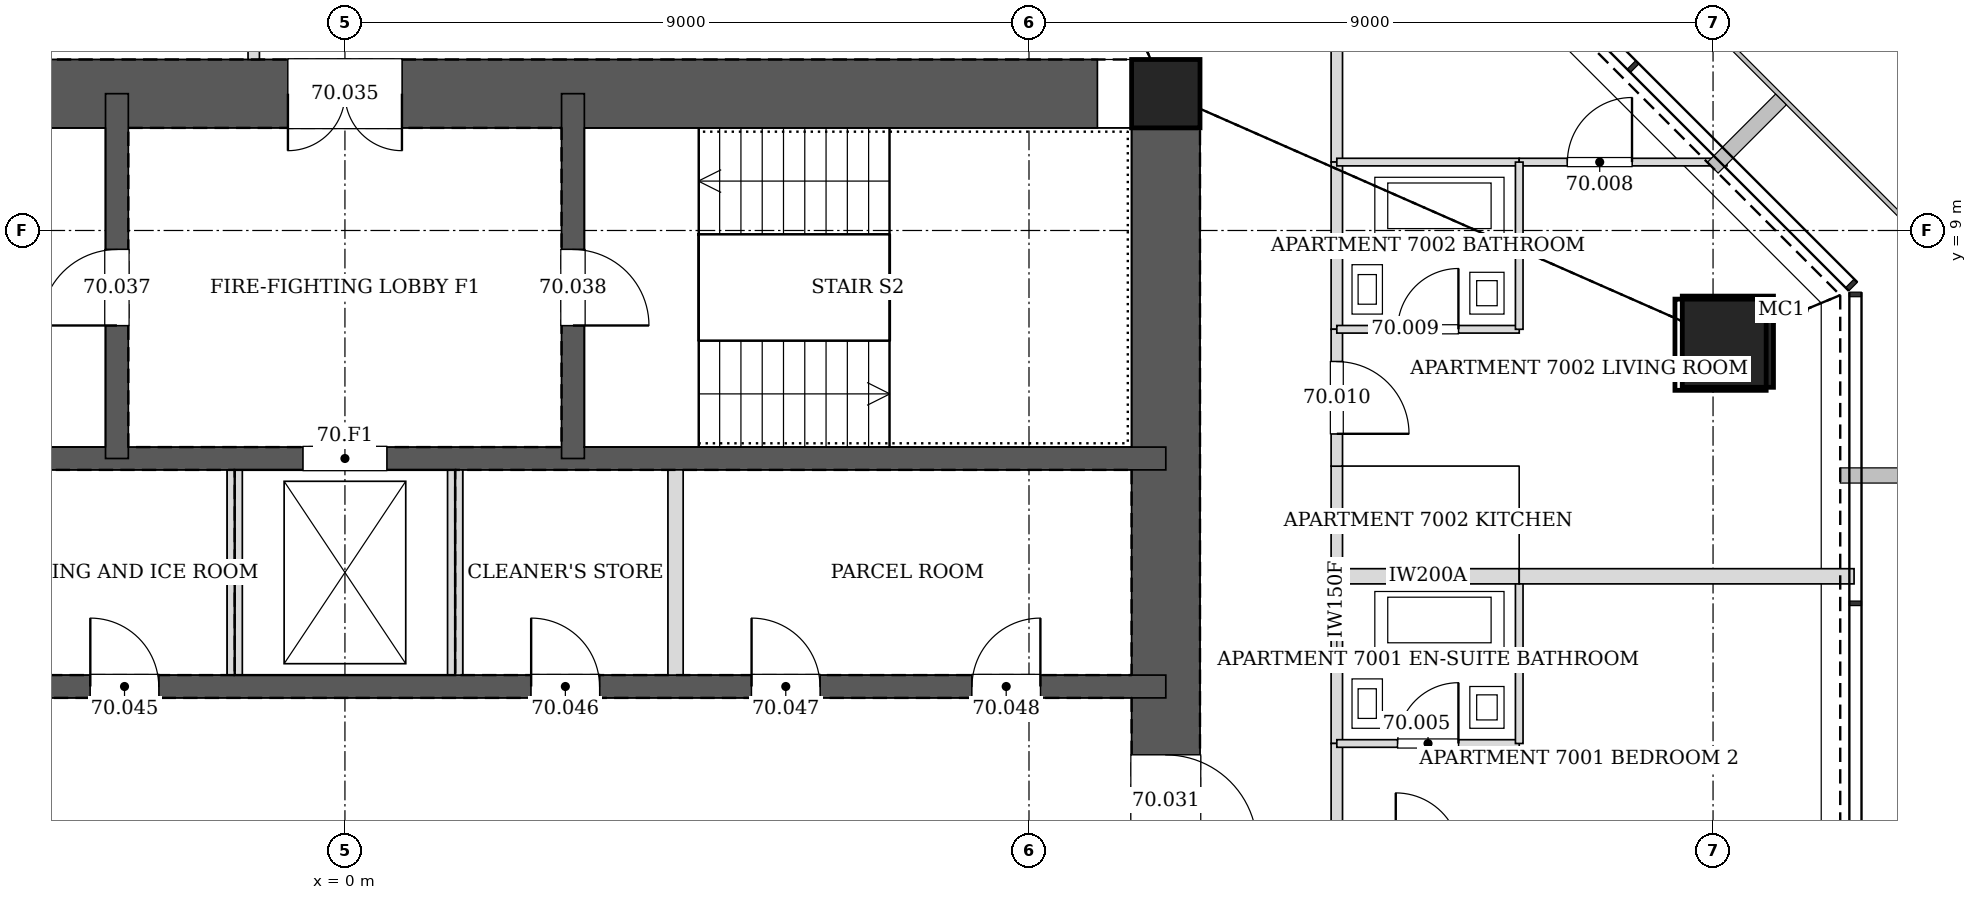
"""IFC4 building model, lengths in metres.
Left out: names, types, materials, properties, quantities, classifications, styles, units other than length and angle.
Written with IfcOpenShell. Run it as: python <this file> out.ifc"""

import sys

from ifc_helpers import new_model, si_unit, direction, frame, frame_2d, origin, origin_2d, place, context, subcontext, project, spatial, rectangle, hollow_rectangle, extrude, element, fill, save


model = new_model("IFC4")
c1 = context("Model", 3, precision=1e-05, world=origin(), true_north=direction((0.0, 1.0)))
c2 = subcontext(c1, "Body", "Model", "MODEL_VIEW")
j1 = project(units=[si_unit("LENGTHUNIT", "METRE"), si_unit("PLANEANGLEUNIT", "RADIAN")], contexts=[c1])
p1 = place(None, origin())
s1 = spatial("IfcSite", under=j1, at=p1, CompositionType="ELEMENT")
p2 = place(p1, origin())
s2 = spatial("IfcBuilding", under=s1, at=p2, CompositionType="ELEMENT")
p3 = place(p2, frame((0.0, 0.0, 287.8)))
s3 = spatial("IfcBuildingStorey", under=s2, at=p3, CompositionType="ELEMENT", Elevation=287.8)
p4 = place(p3, frame((18.195, 7.537, 0.0), z_axis=(-0.02827915051, -0.01169924247, 0.999531598986), x_axis=(0.382282742426, -0.924045401938, 0.0)))
e1 = element("IfcColumn", 1, at=p4, inside=s3, PredefinedType="COLUMN", context=c2, shape_type="SweptSolid", body=[
    extrude(hollow_rectangle(XDim=1.2, YDim=1.2, WallThickness=0.055, at=origin_2d()), origin(), (0.0, 0.0, 1.0), 3.402),
])
p5 = place(p3, frame((10.8, 10.8, 0.0), z_axis=(0.0, 0.0, 1.0), x_axis=(1.0, 0.0, 0.0)))
e2 = element("IfcColumn", 2, at=p5, inside=s3, PredefinedType="COLUMN", context=c2, shape_type="SweptSolid", body=[
    extrude(hollow_rectangle(XDim=0.9, YDim=0.9, WallThickness=0.04, at=origin_2d()), origin(), (0.0, 0.0, 1.0), 3.4),
])
p6 = place(p3, frame((10.8, -10.8, 0.0), z_axis=(0.0, 0.0, 1.0), x_axis=(0.0, 1.0, 0.0)))
e3 = element("IfcWall", 3, at=p6, inside=s3, PredefinedType="SOLIDWALL", context=c2, shape_type="SweptSolid", body=[
    extrude(rectangle(XDim=21.6, YDim=0.9, at=frame_2d((10.8, 0.0))), origin(), (0.0, 0.0, 1.0), 3.4),
])
p7 = place(p6, frame((11.7, 0.0, 0.0)))
e4 = element("IfcOpeningElement", 4, at=p7, cuts=e3, PredefinedType="OPENING", context=c2, shape_type="SweptSolid", body=[
    extrude(rectangle(XDim=1.2, YDim=2.1, at=frame_2d((0.6, 1.05))), frame((0.0, 0.46, 0.0), z_axis=(0.0, -1.0, 0.0), x_axis=(1.0, 0.0, 0.0)), (0.0, 0.0, 1.0), 0.92),
])
p8 = place(p6, frame((8.7, 0.0, 0.0)))
e5 = element("IfcOpeningElement", 5, at=p8, cuts=e3, PredefinedType="OPENING", context=c2, shape_type="SweptSolid", body=[
    extrude(rectangle(XDim=1.2, YDim=2.1, at=frame_2d((0.6, 1.05))), frame((0.0, 0.46, 0.0), z_axis=(0.0, -1.0, 0.0), x_axis=(1.0, 0.0, 0.0)), (0.0, 0.0, 1.0), 0.92),
])
p9 = place(p3, frame((10.8, 10.8, 0.0), z_axis=(0.0, 0.0, 1.0), x_axis=(-1.0, 0.0, 0.0)))
e6 = element("IfcWall", 6, at=p9, inside=s3, PredefinedType="SOLIDWALL", context=c2, shape_type="SweptSolid", body=[
    extrude(rectangle(XDim=21.6, YDim=0.9, at=frame_2d((10.8, 0.0))), origin(), (0.0, 0.0, 1.0), 3.4),
])
p10 = place(p9, frame((10.05, 0.0, 0.0)))
e7 = element("IfcOpeningElement", 7, at=p10, cuts=e6, PredefinedType="OPENING", context=c2, shape_type="SweptSolid", body=[
    extrude(rectangle(XDim=1.5, YDim=2.1, at=frame_2d((0.75, 1.05))), frame((0.0, 0.46, 0.0), z_axis=(0.0, -1.0, 0.0), x_axis=(1.0, 0.0, 0.0)), (0.0, 0.0, 1.0), 0.92),
])
p11 = place(p3, frame((-10.8, 3.0, 0.0), z_axis=(0.0, 0.0, 1.0), x_axis=(1.0, 0.0, 0.0)))
e8 = element("IfcWall", 8, at=p11, inside=s3, PredefinedType="SOLIDWALL", context=c2, shape_type="SweptSolid", body=[
    extrude(rectangle(XDim=21.6, YDim=0.3, at=frame_2d((10.8, 0.0))), origin(), (0.0, 0.0, 1.0), 3.4),
])
p12 = place(p11, frame((1.65, 0.0, 0.0)))
e9 = element("IfcOpeningElement", 9, at=p12, cuts=e8, PredefinedType="OPENING", context=c2, shape_type="SweptSolid", body=[
    extrude(rectangle(XDim=0.9, YDim=2.1, at=frame_2d((0.45, 1.05))), frame((0.0, 0.16, 0.0), z_axis=(0.0, -1.0, 0.0), x_axis=(1.0, 0.0, 0.0)), (0.0, 0.0, 1.0), 0.32),
])
p13 = place(p11, frame((7.45, 0.0, 0.0)))
e10 = element("IfcOpeningElement", 10, at=p13, cuts=e8, PredefinedType="OPENING", context=c2, shape_type="SweptSolid", body=[
    extrude(rectangle(XDim=0.9, YDim=2.1, at=frame_2d((0.45, 1.05))), frame((0.0, 0.16, 0.0), z_axis=(0.0, -1.0, 0.0), x_axis=(1.0, 0.0, 0.0)), (0.0, 0.0, 1.0), 0.32),
])
p14 = place(p11, frame((13.25, 0.0, 0.0)))
e11 = element("IfcOpeningElement", 11, at=p14, cuts=e8, PredefinedType="OPENING", context=c2, shape_type="SweptSolid", body=[
    extrude(rectangle(XDim=0.9, YDim=2.1, at=frame_2d((0.45, 1.05))), frame((0.0, 0.16, 0.0), z_axis=(0.0, -1.0, 0.0), x_axis=(1.0, 0.0, 0.0)), (0.0, 0.0, 1.0), 0.32),
])
p15 = place(p11, frame((16.15, 0.0, 0.0)))
e12 = element("IfcOpeningElement", 12, at=p15, cuts=e8, PredefinedType="OPENING", context=c2, shape_type="SweptSolid", body=[
    extrude(rectangle(XDim=0.9, YDim=2.1, at=frame_2d((0.45, 1.05))), frame((0.0, 0.16, 0.0), z_axis=(0.0, -1.0, 0.0), x_axis=(1.0, 0.0, 0.0)), (0.0, 0.0, 1.0), 0.32),
])
p16 = place(p11, frame((19.05, 0.0, 0.0)))
e13 = element("IfcOpeningElement", 13, at=p16, cuts=e8, PredefinedType="OPENING", context=c2, shape_type="SweptSolid", body=[
    extrude(rectangle(XDim=0.9, YDim=2.1, at=frame_2d((0.45, 1.05))), frame((0.0, 0.16, 0.0), z_axis=(0.0, -1.0, 0.0), x_axis=(1.0, 0.0, 0.0)), (0.0, 0.0, 1.0), 0.32),
])
p17 = place(p11, frame((4.55, 0.0, 0.0)))
e14 = element("IfcOpeningElement", 14, at=p17, cuts=e8, PredefinedType="OPENING", context=c2, shape_type="SweptSolid", body=[
    extrude(rectangle(XDim=0.9, YDim=2.1, at=frame_2d((0.45, 1.05))), frame((0.0, 0.16, 0.0), z_axis=(0.0, -1.0, 0.0), x_axis=(1.0, 0.0, 0.0)), (0.0, 0.0, 1.0), 0.32),
])
p18 = place(p3, frame((-10.8, 6.0, 0.0), z_axis=(0.0, 0.0, 1.0), x_axis=(1.0, 0.0, 0.0)))
e15 = element("IfcWall", 15, at=p18, inside=s3, PredefinedType="SOLIDWALL", context=c2, shape_type="SweptSolid", body=[
    extrude(rectangle(XDim=21.6, YDim=0.3, at=frame_2d((10.8, 0.0))), origin(), (0.0, 0.0, 1.0), 3.4),
])
p19 = place(p18, frame((10.25, 0.0, 0.0)))
e16 = element("IfcOpeningElement", 16, at=p19, cuts=e15, PredefinedType="OPENING", context=c2, shape_type="SweptSolid", body=[
    extrude(rectangle(XDim=1.1, YDim=2.1, at=frame_2d((0.55, 1.05))), frame((0.0, 0.16, 0.0), z_axis=(0.0, -1.0, 0.0), x_axis=(1.0, 0.0, 0.0)), (0.0, 0.0, 1.0), 0.32),
])
p20 = place(p3, frame((-3.0, 6.0, 0.0), z_axis=(0.0, 0.0, 1.0), x_axis=(0.0, 1.0, 0.0)))
e17 = element("IfcWall", 17, at=p20, inside=s3, PredefinedType="SOLIDWALL", context=c2, shape_type="SweptSolid", body=[
    extrude(rectangle(XDim=4.8, YDim=0.3, at=frame_2d((2.4, 0.0))), origin(), (0.0, 0.0, 1.0), 3.4),
])
p21 = place(p20, frame((1.75, 0.0, 0.0)))
e18 = element("IfcOpeningElement", 18, at=p21, cuts=e17, PredefinedType="OPENING", context=c2, shape_type="SweptSolid", body=[
    extrude(rectangle(XDim=1.0, YDim=2.1, at=frame_2d((0.5, 1.05))), frame((0.0, 0.16, 0.0), z_axis=(0.0, -1.0, 0.0), x_axis=(1.0, 0.0, 0.0)), (0.0, 0.0, 1.0), 0.32),
])
p22 = place(p3, frame((3.0, 6.0, 0.0), z_axis=(0.0, 0.0, 1.0), x_axis=(0.0, 1.0, 0.0)))
e19 = element("IfcWall", 19, at=p22, inside=s3, PredefinedType="SOLIDWALL", context=c2, shape_type="SweptSolid", body=[
    extrude(rectangle(XDim=4.8, YDim=0.3, at=frame_2d((2.4, 0.0))), origin(), (0.0, 0.0, 1.0), 3.4),
])
p23 = place(p22, frame((1.75, 0.0, 0.0)))
e20 = element("IfcOpeningElement", 20, at=p23, cuts=e19, PredefinedType="OPENING", context=c2, shape_type="SweptSolid", body=[
    extrude(rectangle(XDim=1.0, YDim=2.1, at=frame_2d((0.5, 1.05))), frame((0.0, 0.16, 0.0), z_axis=(0.0, -1.0, 0.0), x_axis=(1.0, 0.0, 0.0)), (0.0, 0.0, 1.0), 0.32),
])
p24 = place(p3, frame((13.05, 2.249, 0.0), z_axis=(0.0, 0.0, 1.0), x_axis=(0.0, 1.0, 0.0)))
e21 = element("IfcWall", 21, at=p24, inside=s3, PredefinedType="PARTITIONING", context=c2, shape_type="SweptSolid", body=[
    extrude(rectangle(XDim=2.202, YDim=0.15, at=frame_2d((1.101, 0.0))), origin(), (0.0, 0.0, 1.0), 3.2),
])
p25 = place(p3, frame((13.05, 0.749, 0.0), z_axis=(0.0, 0.0, 1.0), x_axis=(0.0, 1.0, 0.0)))
e22 = element("IfcWall", 22, at=p25, inside=s3, PredefinedType="PARTITIONING", context=c2, shape_type="SweptSolid", body=[
    extrude(rectangle(XDim=1.502, YDim=0.15, at=frame_2d((0.751, 0.0))), origin(), (0.0, 0.0, 1.0), 3.2),
])
p26 = place(p3, frame((13.05, 9.899, 0.0), z_axis=(0.0, 0.0, 1.0), x_axis=(0.0, 1.0, 0.0)))
e23 = element("IfcWall", 23, at=p26, inside=s3, PredefinedType="PARTITIONING", context=c2, shape_type="SweptSolid", body=[
    extrude(rectangle(XDim=3.151, YDim=0.15, at=frame_2d((1.576, 0.0))), origin(), (0.0, 0.0, 1.0), 2.497),
])
p27 = place(p3, frame((13.05, 7.699, 0.0), z_axis=(0.0, 0.0, 1.0), x_axis=(0.0, 1.0, 0.0)))
e24 = element("IfcWall", 24, at=p27, inside=s3, PredefinedType="PARTITIONING", context=c2, shape_type="SweptSolid", body=[
    extrude(rectangle(XDim=2.202, YDim=0.15, at=frame_2d((1.101, 0.0))), origin(), (0.0, 0.0, 1.0), 2.497),
])
p28 = place(p3, frame((13.05, 4.449, 0.0), z_axis=(0.0, 0.0, 1.0), x_axis=(0.0, 1.0, 0.0)))
e25 = element("IfcWall", 25, at=p28, inside=s3, PredefinedType="PARTITIONING", context=c2, shape_type="SweptSolid", body=[
    extrude(rectangle(XDim=1.452, YDim=0.15, at=frame_2d((0.726, 0.0))), origin(), (0.0, 0.0, 1.0), 3.2),
])
p29 = place(p3, frame((13.05, 5.899, 0.0), z_axis=(0.0, 0.0, 1.0), x_axis=(0.0, 1.0, 0.0)))
e26 = element("IfcWall", 26, at=p29, inside=s3, PredefinedType="PARTITIONING", context=c2, shape_type="SweptSolid", body=[
    extrude(rectangle(XDim=1.802, YDim=0.15, at=frame_2d((0.901, 0.0))), origin(), (0.0, 0.0, 1.0), 3.2),
])
p30 = place(p29, frame((0.426, 0.0, 0.0)))
e27 = element("IfcOpeningElement", 27, at=p30, cuts=e26, PredefinedType="OPENING", context=c2, shape_type="SweptSolid", body=[
    extrude(rectangle(XDim=0.95, YDim=2.1, at=frame_2d((0.475, 1.05))), frame((0.0, 0.085, 0.0), z_axis=(0.0, -1.0, 0.0), x_axis=(1.0, 0.0, 0.0)), (0.0, 0.0, 1.0), 0.17),
])
p31 = place(p3, frame((-1.2, 13.05, 0.0), z_axis=(0.0, 0.0, 1.0), x_axis=(0.0, -1.0, 0.0)))
e28 = element("IfcWall", 28, at=p31, inside=s3, PredefinedType="PARTITIONING", context=c2, shape_type="SweptSolid", body=[
    extrude(rectangle(XDim=1.8, YDim=0.15, at=frame_2d((0.9, 0.0))), origin(), (0.0, 0.0, 1.0), 3.2),
])
p32 = place(p31, frame((0.425, 0.0, 0.0)))
e29 = element("IfcOpeningElement", 29, at=p32, cuts=e28, PredefinedType="OPENING", context=c2, shape_type="SweptSolid", body=[
    extrude(rectangle(XDim=0.95, YDim=2.1, at=frame_2d((0.475, 1.05))), frame((0.0, 0.085, 0.0), z_axis=(0.0, -1.0, 0.0), x_axis=(1.0, 0.0, 0.0)), (0.0, 0.0, 1.0), 0.17),
])
p33 = place(p3, frame((13.05, 2.25, 0.0), z_axis=(0.0, 0.0, 1.0), x_axis=(1.0, 0.0, 0.0)))
e30 = element("IfcWall", 30, at=p33, inside=s3, PredefinedType="PARTITIONING", context=c2, shape_type="SweptSolid", body=[
    extrude(rectangle(XDim=2.4, YDim=0.1, at=frame_2d((1.2, 0.0))), origin(), (0.0, 0.0, 1.0), 2.591),
])
p34 = place(p33, frame((0.8, 0.0, 0.0)))
e31 = element("IfcOpeningElement", 31, at=p34, cuts=e30, PredefinedType="OPENING", context=c2, shape_type="SweptSolid", body=[
    extrude(rectangle(XDim=0.8, YDim=2.1, at=frame_2d((0.4, 1.05))), frame((0.0, 0.06, 0.0), z_axis=(0.0, -1.0, 0.0), x_axis=(1.0, 0.0, 0.0)), (0.0, 0.0, 1.0), 0.12),
])
p35 = place(p3, frame((15.45, 2.25, 0.0), z_axis=(0.0, 0.0, 1.0), x_axis=(0.0, 1.0, 0.0)))
e32 = element("IfcWall", 32, at=p35, inside=s3, PredefinedType="PARTITIONING", context=c2, shape_type="SweptSolid", body=[
    extrude(rectangle(XDim=2.2, YDim=0.1, at=frame_2d((1.1, 0.0))), origin(), (0.0, 0.0, 1.0), 3.2),
])
p36 = place(p3, frame((15.45, 4.45, 0.0), z_axis=(0.0, 0.0, 1.0), x_axis=(-1.0, 0.0, 0.0)))
e33 = element("IfcWall", 33, at=p36, inside=s3, PredefinedType="PARTITIONING", context=c2, shape_type="SweptSolid", body=[
    extrude(rectangle(XDim=2.4, YDim=0.2, at=frame_2d((1.2, 0.0))), origin(), (0.0, 0.0, 1.0), 2.591),
])
p37 = place(p3, frame((19.855, 4.45, 0.0), z_axis=(0.0, 0.0, 1.0), x_axis=(-1.0, 0.0, 0.0)))
e34 = element("IfcWall", 34, at=p37, inside=s3, PredefinedType="PARTITIONING", context=c2, shape_type="SweptSolid", body=[
    extrude(rectangle(XDim=4.405, YDim=0.2, at=frame_2d((2.203, 0.0))), origin(), (0.0, 0.0, 1.0), 2.73),
])
p38 = place(p3, frame((13.05, 9.9, 0.0), z_axis=(0.0, 0.0, 1.0), x_axis=(1.0, 0.0, 0.0)))
e35 = element("IfcWall", 35, at=p38, inside=s3, PredefinedType="PARTITIONING", context=c2, shape_type="SweptSolid", body=[
    extrude(rectangle(XDim=2.401, YDim=0.1, at=frame_2d((1.2, 0.0))), origin(), (0.0, 0.0, 1.0), 2.497),
])
p39 = place(p3, frame((15.449, 9.9, 0.0), z_axis=(0.0, 0.0, 1.0), x_axis=(1.0, 0.0, 0.0)))
e36 = element("IfcWall", 36, at=p39, inside=s3, PredefinedType="PARTITIONING", context=c2, shape_type="SweptSolid", body=[
    extrude(rectangle(XDim=2.734, YDim=0.1, at=frame_2d((1.367, 0.0))), origin(), (0.0, 0.0, 1.0), 2.74),
])
p40 = place(p39, frame((0.635, 0.0, 0.0)))
e37 = element("IfcOpeningElement", 37, at=p40, cuts=e36, PredefinedType="OPENING", context=c2, shape_type="SweptSolid", body=[
    extrude(rectangle(XDim=0.85, YDim=2.1, at=frame_2d((0.425, 1.05))), frame((0.0, 0.06, 0.0), z_axis=(0.0, -1.0, 0.0), x_axis=(1.0, 0.0, 0.0)), (0.0, 0.0, 1.0), 0.12),
])
p41 = place(p3, frame((13.05, 7.7, 0.0), z_axis=(0.0, 0.0, 1.0), x_axis=(1.0, 0.0, 0.0)))
e38 = element("IfcWall", 38, at=p41, inside=s3, PredefinedType="PARTITIONING", context=c2, shape_type="SweptSolid", body=[
    extrude(rectangle(XDim=2.4, YDim=0.1, at=frame_2d((1.2, 0.0))), origin(), (0.0, 0.0, 1.0), 2.591),
])
p42 = place(p41, frame((0.8, 0.0, 0.0)))
e39 = element("IfcOpeningElement", 39, at=p42, cuts=e38, PredefinedType="OPENING", context=c2, shape_type="SweptSolid", body=[
    extrude(rectangle(XDim=0.8, YDim=2.1, at=frame_2d((0.4, 1.05))), frame((0.0, 0.06, 0.0), z_axis=(0.0, -1.0, 0.0), x_axis=(1.0, 0.0, 0.0)), (0.0, 0.0, 1.0), 0.12),
])
p43 = place(p3, frame((15.45, 7.7, 0.0), z_axis=(0.0, 0.0, 1.0), x_axis=(0.0, 1.0, 0.0)))
e40 = element("IfcWall", 40, at=p43, inside=s3, PredefinedType="PARTITIONING", context=c2, shape_type="SweptSolid", body=[
    extrude(rectangle(XDim=2.2, YDim=0.1, at=frame_2d((1.1, 0.0))), origin(), (0.0, 0.0, 1.0), 2.497),
])
for number, where, z_axis, x_axis in (
    (41, (-1.45, 3.15, 0.0), (0.0, 0.0, 1.0), (0.0, 1.0, 0.0)),
    (42, (1.45, 3.15, 0.0), (0.0, 0.0, 1.0), (0.0, 1.0, 0.0)),
    (43, (4.35, 3.15, 0.0), (0.0, 0.0, 1.0), (0.0, 1.0, 0.0)),
):
    element("IfcWall", number, at=place(p3, frame(where, z_axis=z_axis, x_axis=x_axis)), inside=s3, PredefinedType="PARTITIONING", context=c2, shape_type="SweptSolid", body=[
        extrude(rectangle(XDim=2.7, YDim=0.2, at=frame_2d((1.35, 0.0))), origin(), (0.0, 0.0, 1.0), 3.2),
    ])
p44 = place(p34, origin())
e44 = element("IfcDoor", 44, at=p44, inside=s3, OperationType="SINGLE_SWING_RIGHT", PredefinedType="DOOR", context=c2, shape_type="SweptSolid", body=[
    extrude(rectangle(XDim=0.8, YDim=2.1, at=frame_2d((0.4, 1.05))), frame((0.0, 0.025, 0.0), z_axis=(0.0, -1.0, 0.0), x_axis=(1.0, 0.0, 0.0)), (0.0, 0.0, 1.0), 0.05),
])
fill(e31, e44)
p45 = place(p40, origin())
e45 = element("IfcDoor", 45, at=p45, inside=s3, OperationType="SINGLE_SWING_RIGHT", PredefinedType="DOOR", context=c2, shape_type="SweptSolid", body=[
    extrude(rectangle(XDim=0.85, YDim=2.1, at=frame_2d((0.425, 1.05))), frame((0.0, 0.025, 0.0), z_axis=(0.0, -1.0, 0.0), x_axis=(1.0, 0.0, 0.0)), (0.0, 0.0, 1.0), 0.05),
])
fill(e37, e45)
p46 = place(p42, origin())
e46 = element("IfcDoor", 46, at=p46, inside=s3, OperationType="SINGLE_SWING_RIGHT", PredefinedType="DOOR", context=c2, shape_type="SweptSolid", body=[
    extrude(rectangle(XDim=0.8, YDim=2.1, at=frame_2d((0.4, 1.05))), frame((0.0, 0.025, 0.0), z_axis=(0.0, -1.0, 0.0), x_axis=(1.0, 0.0, 0.0)), (0.0, 0.0, 1.0), 0.05),
])
fill(e39, e46)
p47 = place(p30, frame((0.95, 0.0, 0.0), z_axis=(0.0, 0.0, 1.0), x_axis=(-1.0, 0.0, 0.0)))
e47 = element("IfcDoor", 47, at=p47, inside=s3, OperationType="SINGLE_SWING_RIGHT", PredefinedType="DOOR", context=c2, shape_type="SweptSolid", body=[
    extrude(rectangle(XDim=0.95, YDim=2.1, at=frame_2d((0.475, 1.05))), frame((0.0, 0.025, 0.0), z_axis=(0.0, -1.0, 0.0), x_axis=(1.0, 0.0, 0.0)), (0.0, 0.0, 1.0), 0.05),
])
fill(e27, e47)
p48 = place(p7, frame((1.2, 0.0, 0.0), z_axis=(0.0, 0.0, 1.0), x_axis=(-1.0, 0.0, 0.0)))
e48 = element("IfcDoor", 48, at=p48, inside=s3, OperationType="SINGLE_SWING_RIGHT", PredefinedType="DOOR", context=c2, shape_type="SweptSolid", body=[
    extrude(rectangle(XDim=1.2, YDim=2.1, at=frame_2d((0.6, 1.05))), frame((0.0, 0.025, 0.0), z_axis=(0.0, -1.0, 0.0), x_axis=(1.0, 0.0, 0.0)), (0.0, 0.0, 1.0), 0.05),
])
fill(e4, e48)
p49 = place(p10, origin())
e49 = element("IfcDoor", 49, at=p49, inside=s3, OperationType="DOUBLE_DOOR_SINGLE_SWING", PredefinedType="DOOR", context=c2, shape_type="SweptSolid", body=[
    extrude(rectangle(XDim=1.5, YDim=2.1, at=frame_2d((0.75, 1.05))), frame((0.0, 0.025, 0.0), z_axis=(0.0, -1.0, 0.0), x_axis=(1.0, 0.0, 0.0)), (0.0, 0.0, 1.0), 0.05),
])
fill(e7, e49)
p50 = place(p21, origin())
e50 = element("IfcDoor", 50, at=p50, inside=s3, OperationType="SINGLE_SWING_LEFT", PredefinedType="DOOR", context=c2, shape_type="SweptSolid", body=[
    extrude(rectangle(XDim=1.0, YDim=2.1, at=frame_2d((0.5, 1.05))), frame((0.0, 0.025, 0.0), z_axis=(0.0, -1.0, 0.0), x_axis=(1.0, 0.0, 0.0)), (0.0, 0.0, 1.0), 0.05),
])
fill(e18, e50)
p51 = place(p23, frame((1.0, 0.0, 0.0), z_axis=(0.0, 0.0, 1.0), x_axis=(-1.0, 0.0, 0.0)))
e51 = element("IfcDoor", 51, at=p51, inside=s3, OperationType="SINGLE_SWING_RIGHT", PredefinedType="DOOR", context=c2, shape_type="SweptSolid", body=[
    extrude(rectangle(XDim=1.0, YDim=2.1, at=frame_2d((0.5, 1.05))), frame((0.0, 0.025, 0.0), z_axis=(0.0, -1.0, 0.0), x_axis=(1.0, 0.0, 0.0)), (0.0, 0.0, 1.0), 0.05),
])
fill(e20, e51)
p52 = place(p13, origin())
e52 = element("IfcDoor", 52, at=p52, inside=s3, OperationType="SINGLE_SWING_LEFT", PredefinedType="DOOR", context=c2, shape_type="SweptSolid", body=[
    extrude(rectangle(XDim=0.9, YDim=2.1, at=frame_2d((0.45, 1.05))), frame((0.0, 0.025, 0.0), z_axis=(0.0, -1.0, 0.0), x_axis=(1.0, 0.0, 0.0)), (0.0, 0.0, 1.0), 0.05),
])
fill(e10, e52)
p53 = place(p14, origin())
e53 = element("IfcDoor", 53, at=p53, inside=s3, OperationType="SINGLE_SWING_LEFT", PredefinedType="DOOR", context=c2, shape_type="SweptSolid", body=[
    extrude(rectangle(XDim=0.9, YDim=2.1, at=frame_2d((0.45, 1.05))), frame((0.0, 0.025, 0.0), z_axis=(0.0, -1.0, 0.0), x_axis=(1.0, 0.0, 0.0)), (0.0, 0.0, 1.0), 0.05),
])
fill(e11, e53)
p54 = place(p15, origin())
e54 = element("IfcDoor", 54, at=p54, inside=s3, OperationType="SINGLE_SWING_LEFT", PredefinedType="DOOR", context=c2, shape_type="SweptSolid", body=[
    extrude(rectangle(XDim=0.9, YDim=2.1, at=frame_2d((0.45, 1.05))), frame((0.0, 0.025, 0.0), z_axis=(0.0, -1.0, 0.0), x_axis=(1.0, 0.0, 0.0)), (0.0, 0.0, 1.0), 0.05),
])
fill(e12, e54)
p55 = place(p16, origin())
e55 = element("IfcDoor", 55, at=p55, inside=s3, OperationType="SINGLE_SWING_RIGHT", PredefinedType="DOOR", context=c2, shape_type="SweptSolid", body=[
    extrude(rectangle(XDim=0.9, YDim=2.1, at=frame_2d((0.45, 1.05))), frame((0.0, 0.025, 0.0), z_axis=(0.0, -1.0, 0.0), x_axis=(1.0, 0.0, 0.0)), (0.0, 0.0, 1.0), 0.05),
])
fill(e13, e55)
p56 = place(p19, origin())
e56 = element("IfcDoor", 56, at=p56, inside=s3, OperationType="DOUBLE_DOOR_SLIDING", PredefinedType="DOOR", context=c2, shape_type="SweptSolid", body=[
    extrude(rectangle(XDim=1.1, YDim=2.1, at=frame_2d((0.55, 1.05))), frame((0.0, 0.025, 0.0), z_axis=(0.0, -1.0, 0.0), x_axis=(1.0, 0.0, 0.0)), (0.0, 0.0, 1.0), 0.05),
])
fill(e16, e56)
save(model, sys.argv[1])
